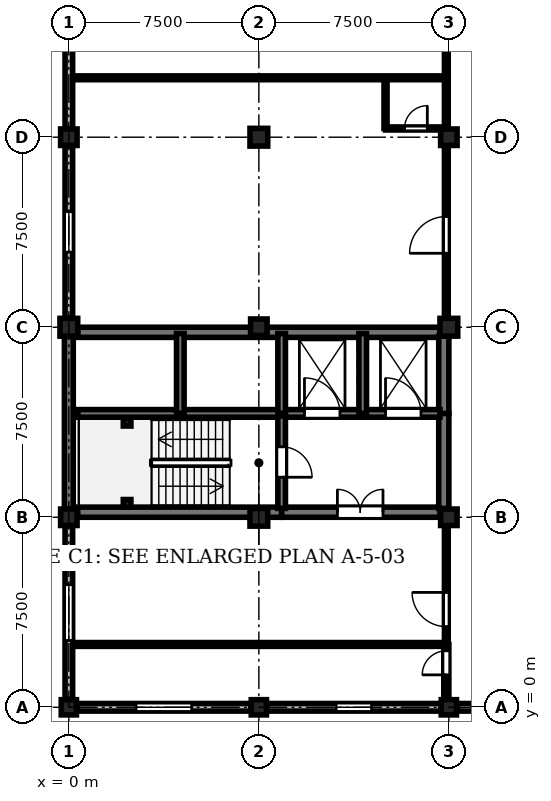
"""IFC4 building model, lengths in metres.
Left out: names, types, materials, properties, quantities, classifications, styles, units other than length and angle.
Written with IfcOpenShell. Run it as: python <this file> out.ifc"""

import sys

from ifc_helpers import new_model, si_unit, direction, frame, frame_2d, origin, origin_with_axes, origin_2d, place, context, subcontext, project, spatial, rectangle, circle, i_section, extrude, element, fill, save


model = new_model("IFC4")
c1 = context("Model", 3, precision=1e-05, world=origin(), true_north=direction((0.0, 1.0)))
c2 = subcontext(c1, "Body", "Model", "MODEL_VIEW")
j1 = project(units=[si_unit("LENGTHUNIT", "METRE"), si_unit("PLANEANGLEUNIT", "RADIAN")], contexts=[c1])
p1 = place(None, origin())
s1 = spatial("IfcSite", under=j1, at=p1, CompositionType="ELEMENT")
p2 = place(p1, origin())
s2 = spatial("IfcBuilding", under=s1, at=p2, CompositionType="ELEMENT")
p3 = place(p2, frame((0.0, 0.0, 17.85)))
s3 = spatial("IfcBuildingStorey", under=s2, at=p3, CompositionType="ELEMENT", Elevation=17.85)
p4 = place(p3, origin_with_axes())
e1 = element("IfcColumn", 1, at=p4, inside=s3, PredefinedType="COLUMN", context=c2, shape_type="SweptSolid", body=[
    extrude(circle(Radius=0.3, at=origin_2d()), origin(), (0.0, 0.0, 1.0), 4.05),
])
p5 = place(p3, frame((0.0, 7.5, 0.0), z_axis=(0.0, 0.0, 1.0), x_axis=(1.0, 0.0, 0.0)))
e2 = element("IfcColumn", 2, at=p5, inside=s3, PredefinedType="COLUMN", context=c2, shape_type="SweptSolid", body=[
    extrude(rectangle(XDim=0.65, YDim=0.65, at=origin_2d()), origin(), (0.0, 0.0, 1.0), 4.05),
])
p6 = place(p3, frame((0.0, 15.0, 0.0), z_axis=(0.0, 0.0, 1.0), x_axis=(1.0, 0.0, 0.0)))
e3 = element("IfcColumn", 3, at=p6, inside=s3, PredefinedType="COLUMN", context=c2, shape_type="SweptSolid", body=[
    extrude(rectangle(XDim=0.7, YDim=0.7, at=origin_2d()), origin(), (0.0, 0.0, 1.0), 4.05),
])
p7 = place(p3, frame((0.0, 22.5, 0.0), z_axis=(0.0, 0.0, 1.0), x_axis=(1.0, 0.0, 0.0)))
e4 = element("IfcColumn", 4, at=p7, inside=s3, PredefinedType="COLUMN", context=c2, shape_type="SweptSolid", body=[
    extrude(rectangle(XDim=0.65, YDim=0.65, at=origin_2d()), origin(), (0.0, 0.0, 1.0), 4.05),
])
p8 = place(p3, frame((7.5, 0.0, 0.0), z_axis=(0.0, 0.0, 1.0), x_axis=(1.0, 0.0, 0.0)))
e5 = element("IfcColumn", 5, at=p8, inside=s3, PredefinedType="COLUMN", context=c2, shape_type="SweptSolid", body=[
    extrude(rectangle(XDim=0.6, YDim=0.6, at=origin_2d()), origin(), (0.0, 0.0, 1.0), 4.05),
])
p9 = place(p3, frame((7.5, 7.5, 0.0), z_axis=(0.0, 0.0, 1.0), x_axis=(1.0, 0.0, 0.0)))
e6 = element("IfcColumn", 6, at=p9, inside=s3, PredefinedType="COLUMN", context=c2, shape_type="SweptSolid", body=[
    extrude(rectangle(XDim=0.7, YDim=0.7, at=origin_2d()), origin(), (0.0, 0.0, 1.0), 4.05),
])
p10 = place(p3, frame((7.5, 15.0, 0.0), z_axis=(0.0, 0.0, 1.0), x_axis=(1.0, 0.0, 0.0)))
e7 = element("IfcColumn", 7, at=p10, inside=s3, PredefinedType="COLUMN", context=c2, shape_type="SweptSolid", body=[
    extrude(rectangle(XDim=0.65, YDim=0.65, at=origin_2d()), origin(), (0.0, 0.0, 1.0), 4.05),
])
p11 = place(p3, frame((7.5, 22.5, 0.0), z_axis=(0.0, 0.0, 1.0), x_axis=(1.0, 0.0, 0.0)))
e8 = element("IfcColumn", 8, at=p11, inside=s3, PredefinedType="COLUMN", context=c2, shape_type="SweptSolid", body=[
    extrude(rectangle(XDim=0.7, YDim=0.7, at=origin_2d()), origin(), (0.0, 0.0, 1.0), 4.05),
])
p12 = place(p3, frame((15.0, 0.0, 0.0), z_axis=(0.0, 0.0, 1.0), x_axis=(1.0, 0.0, 0.0)))
e9 = element("IfcColumn", 9, at=p12, inside=s3, PredefinedType="COLUMN", context=c2, shape_type="SweptSolid", body=[
    extrude(rectangle(XDim=0.6, YDim=0.6, at=origin_2d()), origin(), (0.0, 0.0, 1.0), 4.05),
])
p13 = place(p3, frame((15.0, 7.5, 0.0), z_axis=(0.0, 0.0, 1.0), x_axis=(1.0, 0.0, 0.0)))
e10 = element("IfcColumn", 10, at=p13, inside=s3, PredefinedType="COLUMN", context=c2, shape_type="SweptSolid", body=[
    extrude(rectangle(XDim=0.65, YDim=0.65, at=origin_2d()), origin(), (0.0, 0.0, 1.0), 4.05),
])
p14 = place(p3, frame((15.0, 15.0, 0.0), z_axis=(0.0, 0.0, 1.0), x_axis=(1.0, 0.0, 0.0)))
e11 = element("IfcColumn", 11, at=p14, inside=s3, PredefinedType="COLUMN", context=c2, shape_type="SweptSolid", body=[
    extrude(rectangle(XDim=0.7, YDim=0.7, at=origin_2d()), origin(), (0.0, 0.0, 1.0), 4.05),
])
p15 = place(p3, frame((15.0, 22.5, 0.0), z_axis=(0.0, 0.0, 1.0), x_axis=(1.0, 0.0, 0.0)))
e12 = element("IfcColumn", 12, at=p15, inside=s3, PredefinedType="COLUMN", context=c2, shape_type="SweptSolid", body=[
    extrude(rectangle(XDim=0.65, YDim=0.65, at=origin_2d()), origin(), (0.0, 0.0, 1.0), 4.05),
])
for number, where, z_axis, x_axis in (
    (13, (2.3, 8.05, 0.0), (0.0, 0.0, 1.0), (1.0, 0.0, 0.0)),
    (14, (2.3, 11.25, 0.0), (0.0, 0.0, 1.0), (1.0, 0.0, 0.0)),
):
    element("IfcColumn", number, at=place(p3, frame(where, z_axis=z_axis, x_axis=x_axis)), inside=s3, PredefinedType="COLUMN", context=c2, shape_type="SweptSolid", body=[
        extrude(i_section(OverallWidth=0.3, OverallDepth=0.3, WebThickness=0.011, FlangeThickness=0.019, FilletRadius=0.027, at=origin_2d()), origin(), (0.0, 0.0, 1.0), 4.05),
    ])
p16 = place(p3, frame((7.19, 0.0, 0.0), z_axis=(0.0, 0.0, 1.0), x_axis=(-1.0, 0.0, 0.0)))
e15 = element("IfcWall", 15, at=p16, inside=s3, PredefinedType="STANDARD", context=c2, shape_type="SweptSolid", body=[
    extrude(rectangle(XDim=6.88, YDim=0.3, at=frame_2d((3.44, 0.0))), origin(), (0.0, 0.0, 1.0), 3.17),
])
p17 = place(p16, frame((2.34, 0.0, 0.9)))
e16 = element("IfcOpeningElement", 16, at=p17, cuts=e15, PredefinedType="OPENING", context=c2, shape_type="SweptSolid", body=[
    extrude(rectangle(XDim=2.2, YDim=1.95, at=frame_2d((1.1, 0.975))), frame((0.0, 0.16, 0.0), z_axis=(0.0, -1.0, 0.0), x_axis=(1.0, 0.0, 0.0)), (0.0, 0.0, 1.0), 0.32),
])
p18 = place(p3, frame((0.0, 0.31, 0.0), z_axis=(0.0, 0.0, 1.0), x_axis=(0.0, 1.0, 0.0)))
e17 = element("IfcWall", 17, at=p18, inside=s3, PredefinedType="STANDARD", context=c2, shape_type="SweptSolid", body=[
    extrude(rectangle(XDim=6.855, YDim=0.3, at=frame_2d((3.427, 0.0))), origin(), (0.0, 0.0, 1.0), 3.17),
])
p19 = place(p18, frame((2.327, 0.0, 0.9)))
e18 = element("IfcOpeningElement", 18, at=p19, cuts=e17, PredefinedType="OPENING", context=c2, shape_type="SweptSolid", body=[
    extrude(rectangle(XDim=2.2, YDim=1.95, at=frame_2d((1.1, 0.975))), frame((0.0, 0.16, 0.0), z_axis=(0.0, -1.0, 0.0), x_axis=(1.0, 0.0, 0.0)), (0.0, 0.0, 1.0), 0.32),
])
p20 = place(p3, frame((0.0, 7.835, 0.0), z_axis=(0.0, 0.0, 1.0), x_axis=(0.0, 1.0, 0.0)))
e19 = element("IfcWall", 19, at=p20, inside=s3, PredefinedType="SHEAR", context=c2, shape_type="SweptSolid", body=[
    extrude(rectangle(XDim=6.805, YDim=0.35, at=frame_2d((3.402, 0.0))), origin(), (0.0, 0.0, 1.0), 3.77),
])
p21 = place(p3, frame((0.0, 15.36, 0.0), z_axis=(0.0, 0.0, 1.0), x_axis=(0.0, 1.0, 0.0)))
e20 = element("IfcWall", 20, at=p21, inside=s3, PredefinedType="STANDARD", context=c2, shape_type="SweptSolid", body=[
    extrude(rectangle(XDim=6.805, YDim=0.3, at=frame_2d((3.402, 0.0))), origin(), (0.0, 0.0, 1.0), 3.17),
])
p22 = place(p21, frame((2.603, 0.0, 0.9)))
e21 = element("IfcOpeningElement", 21, at=p22, cuts=e20, PredefinedType="OPENING", context=c2, shape_type="SweptSolid", body=[
    extrude(rectangle(XDim=1.6, YDim=1.8, at=frame_2d((0.8, 0.9))), frame((0.0, 0.16, 0.0), z_axis=(0.0, -1.0, 0.0), x_axis=(1.0, 0.0, 0.0)), (0.0, 0.0, 1.0), 0.32),
])
p23 = place(p3, frame((0.0, 22.835, 0.0), z_axis=(0.0, 0.0, 1.0), x_axis=(0.0, 1.0, 0.0)))
e22 = element("IfcWall", 22, at=p23, inside=s3, PredefinedType="STANDARD", context=c2, shape_type="SweptSolid", body=[
    extrude(rectangle(XDim=8.305, YDim=0.3, at=frame_2d((4.152, 0.0))), origin(), (0.0, 0.0, 1.0), 3.22),
])
p24 = place(p23, frame((3.252, 0.0, 0.9)))
e23 = element("IfcOpeningElement", 23, at=p24, cuts=e22, PredefinedType="OPENING", context=c2, shape_type="SweptSolid", body=[
    extrude(rectangle(XDim=1.8, YDim=1.8, at=frame_2d((0.9, 0.9))), frame((0.0, 0.16, 0.0), z_axis=(0.0, -1.0, 0.0), x_axis=(1.0, 0.0, 0.0)), (0.0, 0.0, 1.0), 0.32),
])
p25 = place(p3, frame((14.69, 0.0, 0.0), z_axis=(0.0, 0.0, 1.0), x_axis=(-1.0, 0.0, 0.0)))
e24 = element("IfcWall", 24, at=p25, inside=s3, PredefinedType="STANDARD", context=c2, shape_type="SweptSolid", body=[
    extrude(rectangle(XDim=6.88, YDim=0.3, at=frame_2d((3.44, 0.0))), origin(), (0.0, 0.0, 1.0), 3.17),
])
p26 = place(p25, frame((2.74, 0.0, 0.9)))
e25 = element("IfcOpeningElement", 25, at=p26, cuts=e24, PredefinedType="OPENING", context=c2, shape_type="SweptSolid", body=[
    extrude(rectangle(XDim=1.4, YDim=1.8, at=frame_2d((0.7, 0.9))), frame((0.0, 0.16, 0.0), z_axis=(0.0, -1.0, 0.0), x_axis=(1.0, 0.0, 0.0)), (0.0, 0.0, 1.0), 0.32),
])
p27 = place(p3, frame((22.19, 0.0, 0.0), z_axis=(0.0, 0.0, 1.0), x_axis=(-1.0, 0.0, 0.0)))
e26 = element("IfcWall", 26, at=p27, inside=s3, PredefinedType="STANDARD", context=c2, shape_type="SweptSolid", body=[
    extrude(rectangle(XDim=6.88, YDim=0.3, at=frame_2d((3.44, 0.0))), origin(), (0.0, 0.0, 1.0), 3.17),
])
p28 = place(p27, frame((2.64, 0.0, 0.9)))
e27 = element("IfcOpeningElement", 27, at=p28, cuts=e26, PredefinedType="OPENING", context=c2, shape_type="SweptSolid", body=[
    extrude(rectangle(XDim=1.6, YDim=1.8, at=frame_2d((0.8, 0.9))), frame((0.0, 0.16, 0.0), z_axis=(0.0, -1.0, 0.0), x_axis=(1.0, 0.0, 0.0)), (0.0, 0.0, 1.0), 0.32),
])
p29 = place(p3, frame((0.35, 7.7, 0.0), z_axis=(0.0, 0.0, 1.0), x_axis=(1.0, 0.0, 0.0)))
e28 = element("IfcWall", 28, at=p29, inside=s3, PredefinedType="SHEAR", context=c2, shape_type="SweptSolid", body=[
    extrude(rectangle(XDim=8.05, YDim=0.4, at=frame_2d((4.025, 0.0))), origin(), (0.0, 0.0, 1.0), 3.77),
])
p30 = place(p3, frame((8.4, 7.7, 0.0), z_axis=(0.0, 0.0, 1.0), x_axis=(1.0, 0.0, 0.0)))
e29 = element("IfcWall", 29, at=p30, inside=s3, PredefinedType="SHEAR", context=c2, shape_type="SweptSolid", body=[
    extrude(rectangle(XDim=6.25, YDim=0.4, at=frame_2d((3.125, 0.0))), origin(), (0.0, 0.0, 1.0), 3.77),
])
p31 = place(p30, frame((2.2, 0.0, 0.0)))
e30 = element("IfcOpeningElement", 30, at=p31, cuts=e29, PredefinedType="OPENING", context=c2, shape_type="SweptSolid", body=[
    extrude(rectangle(XDim=1.8, YDim=2.25, at=frame_2d((0.9, 1.125))), frame((0.0, 0.21, 0.0), z_axis=(0.0, -1.0, 0.0), x_axis=(1.0, 0.0, 0.0)), (0.0, 0.0, 1.0), 0.42),
])
p32 = place(p3, frame((0.35, 14.8, 0.0), z_axis=(0.0, 0.0, 1.0), x_axis=(1.0, 0.0, 0.0)))
e31 = element("IfcWall", 31, at=p32, inside=s3, PredefinedType="SHEAR", context=c2, shape_type="SweptSolid", body=[
    extrude(rectangle(XDim=14.3, YDim=0.4, at=frame_2d((7.15, 0.0))), origin(), (0.0, 0.0, 1.0), 3.77),
])
p33 = place(p3, frame((14.8, 7.85, 0.0), z_axis=(0.0, 0.0, 1.0), x_axis=(0.0, 1.0, 0.0)))
e32 = element("IfcWall", 32, at=p33, inside=s3, PredefinedType="SHEAR", context=c2, shape_type="SweptSolid", body=[
    extrude(rectangle(XDim=3.75, YDim=0.4, at=frame_2d((1.875, 0.0))), origin(), (0.0, 0.0, 1.0), 3.77),
])
p34 = place(p3, frame((14.8, 11.6, 0.0), z_axis=(0.0, 0.0, 1.0), x_axis=(0.0, 1.0, 0.0)))
e33 = element("IfcWall", 33, at=p34, inside=s3, PredefinedType="SHEAR", context=c2, shape_type="SweptSolid", body=[
    extrude(rectangle(XDim=3.05, YDim=0.4, at=frame_2d((1.525, 0.0))), origin(), (0.0, 0.0, 1.0), 3.77),
])
p35 = place(p3, frame((0.35, 11.6, 0.0), z_axis=(0.0, 0.0, 1.0), x_axis=(1.0, 0.0, 0.0)))
e34 = element("IfcWall", 34, at=p35, inside=s3, PredefinedType="SHEAR", context=c2, shape_type="SweptSolid", body=[
    extrude(rectangle(XDim=8.05, YDim=0.3, at=frame_2d((4.025, 0.0))), origin(), (0.0, 0.0, 1.0), 3.77),
])
p36 = place(p3, frame((8.4, 11.6, 0.0), z_axis=(0.0, 0.0, 1.0), x_axis=(1.0, 0.0, 0.0)))
e35 = element("IfcWall", 35, at=p36, inside=s3, PredefinedType="SHEAR", context=c2, shape_type="SweptSolid", body=[
    extrude(rectangle(XDim=6.25, YDim=0.3, at=frame_2d((3.125, 0.0))), origin(), (0.0, 0.0, 1.0), 3.77),
])
p37 = place(p36, frame((0.9, 0.0, 0.0)))
e36 = element("IfcOpeningElement", 36, at=p37, cuts=e35, PredefinedType="OPENING", context=c2, shape_type="SweptSolid", body=[
    extrude(rectangle(XDim=1.4, YDim=2.25, at=frame_2d((0.7, 1.125))), frame((0.0, 0.16, 0.0), z_axis=(0.0, -1.0, 0.0), x_axis=(1.0, 0.0, 0.0)), (0.0, 0.0, 1.0), 0.32),
])
p38 = place(p36, frame((4.1, 0.0, 0.0)))
e37 = element("IfcOpeningElement", 37, at=p38, cuts=e35, PredefinedType="OPENING", context=c2, shape_type="SweptSolid", body=[
    extrude(rectangle(XDim=1.4, YDim=2.25, at=frame_2d((0.7, 1.125))), frame((0.0, 0.16, 0.0), z_axis=(0.0, -1.0, 0.0), x_axis=(1.0, 0.0, 0.0)), (0.0, 0.0, 1.0), 0.32),
])
p39 = place(p3, frame((8.4, 11.5, 0.0), z_axis=(0.0, 0.0, 1.0), x_axis=(0.0, -1.0, 0.0)))
e38 = element("IfcWall", 38, at=p39, inside=s3, PredefinedType="SHEAR", context=c2, shape_type="SweptSolid", body=[
    extrude(rectangle(XDim=3.65, YDim=0.3, at=frame_2d((1.825, 0.0))), origin(), (0.0, 0.0, 1.0), 3.77),
])
p40 = place(p39, frame((1.22, 0.0, 0.0)))
e39 = element("IfcOpeningElement", 39, at=p40, cuts=e38, PredefinedType="OPENING", context=c2, shape_type="SweptSolid", body=[
    extrude(rectangle(XDim=1.2, YDim=2.25, at=frame_2d((0.6, 1.125))), frame((0.0, 0.16, 0.0), z_axis=(0.0, -1.0, 0.0), x_axis=(1.0, 0.0, 0.0)), (0.0, 0.0, 1.0), 0.32),
])
for number, where, z_axis, x_axis in (
    (40, (4.4, 11.6, 0.0), (0.0, 0.0, 1.0), (0.0, 1.0, 0.0)),
    (41, (8.4, 11.6, 0.0), (0.0, 0.0, 1.0), (0.0, 1.0, 0.0)),
    (42, (11.6, 11.6, 0.0), (0.0, 0.0, 1.0), (0.0, 1.0, 0.0)),
):
    element("IfcWall", number, at=place(p3, frame(where, z_axis=z_axis, x_axis=x_axis)), inside=s3, PredefinedType="SHEAR", context=c2, shape_type="SweptSolid", body=[
        extrude(rectangle(XDim=3.15, YDim=0.3, at=frame_2d((1.575, 0.0))), origin(), (0.0, 0.0, 1.0), 3.77),
    ])
p41 = place(p3, frame((14.9, 0.43, 0.0), z_axis=(0.0, 0.0, 1.0), x_axis=(0.0, 1.0, 0.0)))
e43 = element("IfcWall", 43, at=p41, inside=s3, PredefinedType="STANDARD", context=c2, shape_type="SweptSolid", body=[
    extrude(rectangle(XDim=2.05, YDim=0.2, at=frame_2d((1.025, 0.0))), origin(), (0.0, 0.0, 1.0), 3.205),
])
p42 = place(p41, frame((0.85, 0.0, 0.0)))
e44 = element("IfcOpeningElement", 44, at=p42, cuts=e43, PredefinedType="OPENING", context=c2, shape_type="SweptSolid", body=[
    extrude(rectangle(XDim=0.95, YDim=2.15, at=frame_2d((0.475, 1.075))), frame((0.0, 0.11, 0.0), z_axis=(0.0, -1.0, 0.0), x_axis=(1.0, 0.0, 0.0)), (0.0, 0.0, 1.0), 0.22),
])
p43 = place(p3, frame((14.9, 2.68, 0.0), z_axis=(0.0, 0.0, 1.0), x_axis=(0.0, 1.0, 0.0)))
e45 = element("IfcWall", 45, at=p43, inside=s3, PredefinedType="PARTITIONING", context=c2, shape_type="SweptSolid", body=[
    extrude(rectangle(XDim=4.39, YDim=0.15, at=frame_2d((2.195, 0.0))), origin(), (0.0, 0.0, 1.0), 3.205),
])
p44 = place(p43, frame((0.504, 0.0, 0.0)))
e46 = element("IfcOpeningElement", 46, at=p44, cuts=e45, PredefinedType="OPENING", context=c2, shape_type="SweptSolid", body=[
    extrude(rectangle(XDim=1.35, YDim=2.25, at=frame_2d((0.675, 1.125))), frame((0.0, 0.085, 0.0), z_axis=(0.0, -1.0, 0.0), x_axis=(1.0, 0.0, 0.0)), (0.0, 0.0, 1.0), 0.17),
])
p45 = place(p3, frame((14.9, 15.43, 0.0), z_axis=(0.0, 0.0, 1.0), x_axis=(0.0, 1.0, 0.0)))
e47 = element("IfcWall", 47, at=p45, inside=s3, PredefinedType="PARTITIONING", context=c2, shape_type="SweptSolid", body=[
    extrude(rectangle(XDim=9.415, YDim=0.15, at=frame_2d((4.708, 0.0))), origin(), (0.0, 0.0, 1.0), 3.055),
])
p46 = place(p45, frame((2.49, 0.0, 0.0)))
e48 = element("IfcOpeningElement", 48, at=p46, cuts=e47, PredefinedType="OPENING", context=c2, shape_type="SweptSolid", body=[
    extrude(rectangle(XDim=1.45, YDim=2.3, at=frame_2d((0.725, 1.15))), frame((0.0, 0.085, 0.0), z_axis=(0.0, -1.0, 0.0), x_axis=(1.0, 0.0, 0.0)), (0.0, 0.0, 1.0), 0.17),
])
p47 = place(p3, frame((12.5, 22.845, 0.0), z_axis=(0.0, 0.0, 1.0), x_axis=(1.0, 0.0, 0.0)))
e49 = element("IfcWall", 49, at=p47, inside=s3, PredefinedType="PARTITIONING", context=c2, shape_type="SweptSolid", body=[
    extrude(rectangle(XDim=2.4, YDim=0.12, at=frame_2d((1.2, 0.0))), origin(), (0.0, 0.0, 1.0), 3.155),
])
p48 = place(p47, frame((0.75, 0.0, 0.0)))
e50 = element("IfcOpeningElement", 50, at=p48, cuts=e49, PredefinedType="OPENING", context=c2, shape_type="SweptSolid", body=[
    extrude(rectangle(XDim=0.9, YDim=2.1, at=frame_2d((0.45, 1.05))), frame((0.0, 0.07, 0.0), z_axis=(0.0, -1.0, 0.0), x_axis=(1.0, 0.0, 0.0)), (0.0, 0.0, 1.0), 0.14),
])
p49 = place(p3, frame((12.5, 22.845, 0.0), z_axis=(0.0, 0.0, 1.0), x_axis=(0.0, 1.0, 0.0)))
e51 = element("IfcWall", 51, at=p49, inside=s3, PredefinedType="PARTITIONING", context=c2, shape_type="SweptSolid", body=[
    extrude(rectangle(XDim=2.0, YDim=0.12, at=frame_2d((1.0, 0.0))), origin(), (0.0, 0.0, 1.0), 3.755),
])
p50 = place(p3, frame((14.9, 25.005, 0.0), z_axis=(0.0, 0.0, 1.0), x_axis=(0.0, 1.0, 0.0)))
e52 = element("IfcWall", 52, at=p50, inside=s3, PredefinedType="PARTITIONING", context=c2, shape_type="SweptSolid", body=[
    extrude(rectangle(XDim=9.415, YDim=0.15, at=frame_2d((4.708, 0.0))), origin(), (0.0, 0.0, 1.0), 3.055),
])
p51 = place(p50, frame((1.007, 0.0, 0.0)))
e53 = element("IfcOpeningElement", 53, at=p51, cuts=e52, PredefinedType="OPENING", context=c2, shape_type="SweptSolid", body=[
    extrude(rectangle(XDim=1.35, YDim=2.25, at=frame_2d((0.675, 1.125))), frame((0.0, 0.085, 0.0), z_axis=(0.0, -1.0, 0.0), x_axis=(1.0, 0.0, 0.0)), (0.0, 0.0, 1.0), 0.17),
])
for number, where, z_axis, x_axis in (
    (54, (0.35, 2.48, 0.0), (0.0, 0.0, 1.0), (1.0, 0.0, 0.0)),
    (55, (0.35, 24.845, 0.0), (0.0, 0.0, 1.0), (1.0, 0.0, 0.0)),
):
    element("IfcWall", number, at=place(p3, frame(where, z_axis=z_axis, x_axis=x_axis)), inside=s3, PredefinedType="PARTITIONING", context=c2, shape_type="SweptSolid", body=[
        extrude(rectangle(XDim=14.55, YDim=0.15, at=frame_2d((7.275, 0.0))), origin(), (0.0, 0.0, 1.0), 3.755),
    ])
p52 = place(p17, origin())
e56 = element("IfcWindow", 56, at=p52, inside=s3, PartitioningType="SINGLE_PANEL", PredefinedType="WINDOW", context=c2, shape_type="SweptSolid", body=[
    extrude(rectangle(XDim=2.2, YDim=1.95, at=frame_2d((1.1, 0.975))), frame((0.0, 0.03, 0.0), z_axis=(0.0, -1.0, 0.0), x_axis=(1.0, 0.0, 0.0)), (0.0, 0.0, 1.0), 0.06),
])
fill(e16, e56)
p53 = place(p19, origin())
e57 = element("IfcWindow", 57, at=p53, inside=s3, PartitioningType="SINGLE_PANEL", PredefinedType="WINDOW", context=c2, shape_type="SweptSolid", body=[
    extrude(rectangle(XDim=2.2, YDim=1.95, at=frame_2d((1.1, 0.975))), frame((0.0, 0.03, 0.0), z_axis=(0.0, -1.0, 0.0), x_axis=(1.0, 0.0, 0.0)), (0.0, 0.0, 1.0), 0.06),
])
fill(e18, e57)
p54 = place(p22, origin())
e58 = element("IfcWindow", 58, at=p54, inside=s3, PartitioningType="SINGLE_PANEL", PredefinedType="WINDOW", context=c2, shape_type="SweptSolid", body=[
    extrude(rectangle(XDim=1.6, YDim=1.8, at=frame_2d((0.8, 0.9))), frame((0.0, 0.03, 0.0), z_axis=(0.0, -1.0, 0.0), x_axis=(1.0, 0.0, 0.0)), (0.0, 0.0, 1.0), 0.06),
])
fill(e21, e58)
p55 = place(p26, origin())
e59 = element("IfcWindow", 59, at=p55, inside=s3, PartitioningType="SINGLE_PANEL", PredefinedType="WINDOW", context=c2, shape_type="SweptSolid", body=[
    extrude(rectangle(XDim=1.4, YDim=1.8, at=frame_2d((0.7, 0.9))), frame((0.0, 0.03, 0.0), z_axis=(0.0, -1.0, 0.0), x_axis=(1.0, 0.0, 0.0)), (0.0, 0.0, 1.0), 0.06),
])
fill(e25, e59)
p56 = place(p31, origin())
e60 = element("IfcDoor", 60, at=p56, inside=s3, OperationType="DOUBLE_DOOR_SINGLE_SWING", PredefinedType="DOOR", context=c2, shape_type="SweptSolid", body=[
    extrude(rectangle(XDim=1.8, YDim=2.25, at=frame_2d((0.9, 1.125))), frame((0.0, 0.025, 0.0), z_axis=(0.0, -1.0, 0.0), x_axis=(1.0, 0.0, 0.0)), (0.0, 0.0, 1.0), 0.05),
])
fill(e30, e60)
p57 = place(p37, origin())
e61 = element("IfcDoor", 61, at=p57, inside=s3, OperationType="DOUBLE_DOOR_SLIDING", PredefinedType="DOOR", context=c2, shape_type="SweptSolid", body=[
    extrude(rectangle(XDim=1.4, YDim=2.25, at=frame_2d((0.7, 1.125))), frame((0.0, 0.025, 0.0), z_axis=(0.0, -1.0, 0.0), x_axis=(1.0, 0.0, 0.0)), (0.0, 0.0, 1.0), 0.05),
])
fill(e36, e61)
p58 = place(p38, origin())
e62 = element("IfcDoor", 62, at=p58, inside=s3, OperationType="DOUBLE_DOOR_SLIDING", PredefinedType="DOOR", context=c2, shape_type="SweptSolid", body=[
    extrude(rectangle(XDim=1.4, YDim=2.25, at=frame_2d((0.7, 1.125))), frame((0.0, 0.025, 0.0), z_axis=(0.0, -1.0, 0.0), x_axis=(1.0, 0.0, 0.0)), (0.0, 0.0, 1.0), 0.05),
])
fill(e37, e62)
p59 = place(p40, origin())
e63 = element("IfcDoor", 63, at=p59, inside=s3, OperationType="SINGLE_SWING_RIGHT", PredefinedType="DOOR", context=c2, shape_type="SweptSolid", body=[
    extrude(rectangle(XDim=1.2, YDim=2.25, at=frame_2d((0.6, 1.125))), frame((0.0, 0.025, 0.0), z_axis=(0.0, -1.0, 0.0), x_axis=(1.0, 0.0, 0.0)), (0.0, 0.0, 1.0), 0.05),
])
fill(e39, e63)
p60 = place(p42, origin())
e64 = element("IfcDoor", 64, at=p60, inside=s3, OperationType="SINGLE_SWING_LEFT", PredefinedType="DOOR", context=c2, shape_type="SweptSolid", body=[
    extrude(rectangle(XDim=0.95, YDim=2.15, at=frame_2d((0.475, 1.075))), frame((0.0, 0.025, 0.0), z_axis=(0.0, -1.0, 0.0), x_axis=(1.0, 0.0, 0.0)), (0.0, 0.0, 1.0), 0.05),
])
fill(e44, e64)
p61 = place(p44, origin())
e65 = element("IfcDoor", 65, at=p61, inside=s3, OperationType="SINGLE_SWING_RIGHT", PredefinedType="DOOR", context=c2, shape_type="SweptSolid", body=[
    extrude(rectangle(XDim=1.35, YDim=2.25, at=frame_2d((0.675, 1.125))), frame((0.0, 0.025, 0.0), z_axis=(0.0, -1.0, 0.0), x_axis=(1.0, 0.0, 0.0)), (0.0, 0.0, 1.0), 0.05),
])
fill(e46, e65)
p62 = place(p46, origin())
e66 = element("IfcDoor", 66, at=p62, inside=s3, OperationType="SINGLE_SWING_LEFT", PredefinedType="DOOR", context=c2, shape_type="SweptSolid", body=[
    extrude(rectangle(XDim=1.45, YDim=2.3, at=frame_2d((0.725, 1.15))), frame((0.0, 0.025, 0.0), z_axis=(0.0, -1.0, 0.0), x_axis=(1.0, 0.0, 0.0)), (0.0, 0.0, 1.0), 0.05),
])
fill(e48, e66)
p63 = place(p48, origin())
e67 = element("IfcDoor", 67, at=p63, inside=s3, OperationType="SINGLE_SWING_RIGHT", PredefinedType="DOOR", context=c2, shape_type="SweptSolid", body=[
    extrude(rectangle(XDim=0.9, YDim=2.1, at=frame_2d((0.45, 1.05))), frame((0.0, 0.025, 0.0), z_axis=(0.0, -1.0, 0.0), x_axis=(1.0, 0.0, 0.0)), (0.0, 0.0, 1.0), 0.05),
])
fill(e50, e67)
save(model, sys.argv[1])
